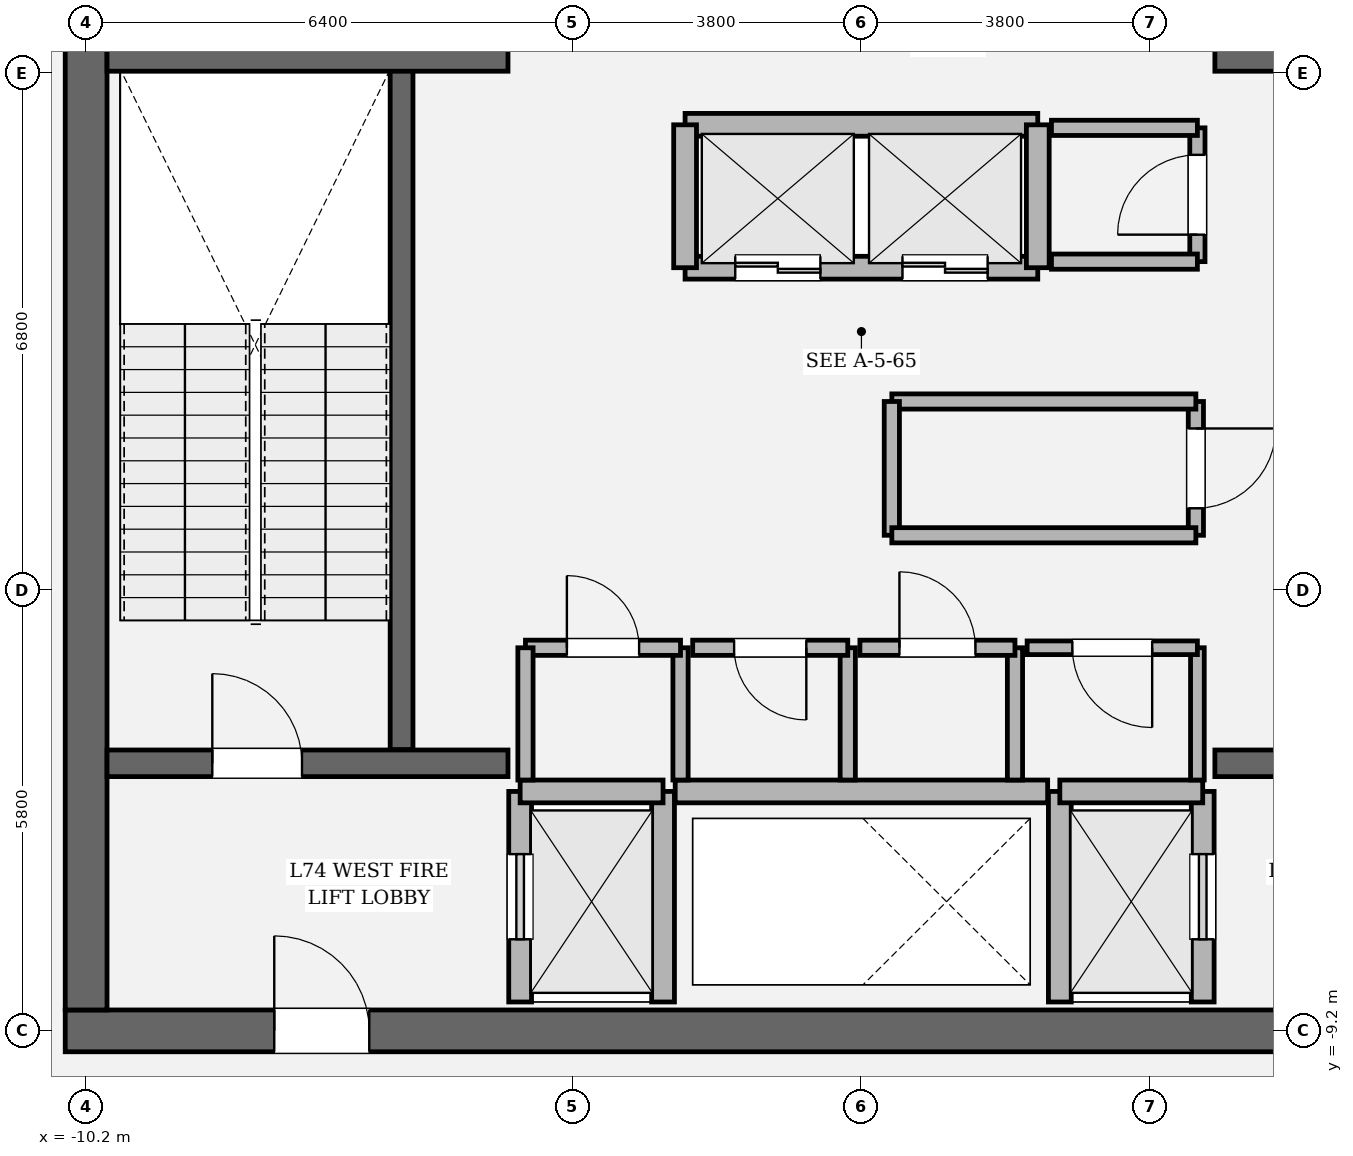
"""IFC4 building model, lengths in metres.
Left out: names, types, materials, properties, quantities, classifications, styles, units other than length and angle.
Written with IfcOpenShell. Run it as: python <this file> out.ifc"""

import sys

from ifc_helpers import new_model, si_unit, direction, frame, frame_2d, origin, place, context, subcontext, project, spatial, rectangle, extrude, element, fill, save


model = new_model("IFC4")
c1 = context("Model", 3, precision=1e-05, world=origin(), true_north=direction((0.0, 1.0)))
c2 = subcontext(c1, "Body", "Model", "MODEL_VIEW")
j1 = project(units=[si_unit("LENGTHUNIT", "METRE"), si_unit("PLANEANGLEUNIT", "RADIAN")], contexts=[c1])
p1 = place(None, origin())
s1 = spatial("IfcSite", under=j1, at=p1, CompositionType="ELEMENT")
p2 = place(p1, origin())
s2 = spatial("IfcBuilding", under=s1, at=p2, CompositionType="ELEMENT")
p3 = place(p2, frame((0.0, 0.0, 313.2)))
s3 = spatial("IfcBuildingStorey", under=s2, at=p3, CompositionType="ELEMENT", Elevation=313.2)
p4 = place(p3, frame((10.475, -9.2, 0.0), z_axis=(0.0, 0.0, 1.0), x_axis=(-1.0, 0.0, 0.0)))
e1 = element("IfcWall", 1, at=p4, inside=s3, PredefinedType="SHEAR", context=c2, shape_type="SweptSolid", body=[
    extrude(rectangle(XDim=20.95, YDim=0.55, at=frame_2d((10.475, 0.0))), origin(), (0.0, 0.0, 1.0), 4.2),
])
p5 = place(p4, frame((2.75, 0.0, 0.0)))
e2 = element("IfcOpeningElement", 2, at=p5, cuts=e1, PredefinedType="OPENING", context=c2, shape_type="SweptSolid", body=[
    extrude(rectangle(XDim=1.25, YDim=2.25, at=frame_2d((0.625, 1.125))), frame((0.0, 0.285, 0.0), z_axis=(0.0, -1.0, 0.0), x_axis=(1.0, 0.0, 0.0)), (0.0, 0.0, 1.0), 0.57),
])
p6 = place(p4, frame((16.95, 0.0, 0.0)))
e3 = element("IfcOpeningElement", 3, at=p6, cuts=e1, PredefinedType="OPENING", context=c2, shape_type="SweptSolid", body=[
    extrude(rectangle(XDim=1.25, YDim=2.25, at=frame_2d((0.625, 1.125))), frame((0.0, 0.285, 0.0), z_axis=(0.0, -1.0, 0.0), x_axis=(1.0, 0.0, 0.0)), (0.0, 0.0, 1.0), 0.57),
])
p7 = place(p3, frame((-10.2, -8.925, 0.0), z_axis=(0.0, 0.0, 1.0), x_axis=(0.0, 1.0, 0.0)))
e4 = element("IfcWall", 4, at=p7, inside=s3, PredefinedType="SHEAR", context=c2, shape_type="SweptSolid", body=[
    extrude(rectangle(XDim=17.85, YDim=0.55, at=frame_2d((8.925, 0.0))), origin(), (0.0, 0.0, 1.0), 4.2),
])
p8 = place(p7, frame((12.715, 0.0, 0.0)))
e5 = element("IfcOpeningElement", 5, at=p8, cuts=e4, PredefinedType="OPENING", context=c2, shape_type="SweptSolid", body=[
    extrude(rectangle(XDim=1.18, YDim=2.2, at=frame_2d((0.59, 1.1))), frame((0.0, 0.285, 0.0), z_axis=(0.0, -1.0, 0.0), x_axis=(1.0, 0.0, 0.0)), (0.0, 0.0, 1.0), 0.57),
])
p9 = place(p3, frame((-6.05, -5.5, 0.0), z_axis=(0.0, 0.0, 1.0), x_axis=(0.0, 1.0, 0.0)))
e6 = element("IfcWall", 6, at=p9, inside=s3, PredefinedType="SOLIDWALL", context=c2, shape_type="SweptSolid", body=[
    extrude(rectangle(XDim=8.95, YDim=0.3, at=frame_2d((4.475, 0.0))), origin(), (0.0, 0.0, 1.0), 4.2),
])
p10 = place(p3, frame((-9.925, -5.68, 0.0), z_axis=(0.0, 0.0, 1.0), x_axis=(1.0, 0.0, 0.0)))
e7 = element("IfcWall", 7, at=p10, inside=s3, PredefinedType="SOLIDWALL", context=c2, shape_type="SweptSolid", body=[
    extrude(rectangle(XDim=5.275, YDim=0.35, at=frame_2d((2.638, 0.0))), origin(), (0.0, 0.0, 1.0), 4.2),
])
p11 = place(p10, frame((1.385, 0.0, 0.0)))
e8 = element("IfcOpeningElement", 8, at=p11, cuts=e7, PredefinedType="OPENING", context=c2, shape_type="SweptSolid", body=[
    extrude(rectangle(XDim=1.18, YDim=2.2, at=frame_2d((0.59, 1.1))), frame((0.0, 0.185, 0.0), z_axis=(0.0, -1.0, 0.0), x_axis=(1.0, 0.0, 0.0)), (0.0, 0.0, 1.0), 0.37),
])
p12 = place(p3, frame((4.65, -5.68, 0.0), z_axis=(0.0, 0.0, 1.0), x_axis=(1.0, 0.0, 0.0)))
e9 = element("IfcWall", 9, at=p12, inside=s3, PredefinedType="SOLIDWALL", context=c2, shape_type="SweptSolid", body=[
    extrude(rectangle(XDim=5.275, YDim=0.35, at=frame_2d((2.638, 0.0))), origin(), (0.0, 0.0, 1.0), 4.2),
])
p13 = place(p12, frame((2.71, 0.0, 0.0)))
e10 = element("IfcOpeningElement", 10, at=p13, cuts=e9, PredefinedType="OPENING", context=c2, shape_type="SweptSolid", body=[
    extrude(rectangle(XDim=1.18, YDim=2.2, at=frame_2d((0.59, 1.1))), frame((0.0, 0.185, 0.0), z_axis=(0.0, -1.0, 0.0), x_axis=(1.0, 0.0, 0.0)), (0.0, 0.0, 1.0), 0.37),
])
for number, where, z_axis, x_axis in (
    (11, (-9.925, 3.6, 0.0), (0.0, 0.0, 1.0), (1.0, 0.0, 0.0)),
    (12, (4.65, 3.6, 0.0), (0.0, 0.0, 1.0), (1.0, 0.0, 0.0)),
):
    element("IfcWall", number, at=place(p3, frame(where, z_axis=z_axis, x_axis=x_axis)), inside=s3, PredefinedType="SOLIDWALL", context=c2, shape_type="SweptSolid", body=[
        extrude(rectangle(XDim=5.275, YDim=0.35, at=frame_2d((2.638, 0.0))), origin(), (0.0, 0.0, 1.0), 4.2),
    ])
p14 = place(p3, frame((-4.49, -8.82, 0.0), z_axis=(0.0, 0.0, 1.0), x_axis=(0.0, 1.0, 0.0)))
e13 = element("IfcWall", 13, at=p14, inside=s3, PredefinedType="SOLIDWALL", context=c2, shape_type="SweptSolid", body=[
    extrude(rectangle(XDim=2.77, YDim=0.3, at=frame_2d((1.385, 0.0))), origin(), (0.0, 0.0, 1.0), 3.92),
])
p15 = place(p14, frame((0.825, 0.0, 0.0)))
e14 = element("IfcOpeningElement", 14, at=p15, cuts=e13, PredefinedType="OPENING", context=c2, shape_type="SweptSolid", body=[
    extrude(rectangle(XDim=1.12, YDim=2.25, at=frame_2d((0.56, 1.125))), frame((0.0, 0.16, 0.0), z_axis=(0.0, -1.0, 0.0), x_axis=(1.0, 0.0, 0.0)), (0.0, 0.0, 1.0), 0.32),
])
p16 = place(p3, frame((-2.61, -8.82, 0.0), z_axis=(0.0, 0.0, 1.0), x_axis=(0.0, 1.0, 0.0)))
e15 = element("IfcWall", 15, at=p16, inside=s3, PredefinedType="SOLIDWALL", context=c2, shape_type="SweptSolid", body=[
    extrude(rectangle(XDim=2.77, YDim=0.3, at=frame_2d((1.385, 0.0))), origin(), (0.0, 0.0, 1.0), 3.92),
])
p17 = place(p3, frame((-4.49, -6.05, 0.0), z_axis=(0.0, 0.0, 1.0), x_axis=(1.0, 0.0, 0.0)))
e16 = element("IfcWall", 16, at=p17, inside=s3, PredefinedType="SOLIDWALL", context=c2, shape_type="SweptSolid", body=[
    extrude(rectangle(XDim=1.88, YDim=0.3, at=frame_2d((0.94, 0.0))), origin(), (0.0, 0.0, 1.0), 3.92),
])
p18 = place(p3, frame((4.49, -8.82, 0.0), z_axis=(0.0, 0.0, 1.0), x_axis=(0.0, 1.0, 0.0)))
e17 = element("IfcWall", 17, at=p18, inside=s3, PredefinedType="SOLIDWALL", context=c2, shape_type="SweptSolid", body=[
    extrude(rectangle(XDim=2.77, YDim=0.3, at=frame_2d((1.385, 0.0))), origin(), (0.0, 0.0, 1.0), 3.92),
])
p19 = place(p18, frame((0.825, 0.0, 0.0)))
e18 = element("IfcOpeningElement", 18, at=p19, cuts=e17, PredefinedType="OPENING", context=c2, shape_type="SweptSolid", body=[
    extrude(rectangle(XDim=1.12, YDim=2.25, at=frame_2d((0.56, 1.125))), frame((0.0, 0.16, 0.0), z_axis=(0.0, -1.0, 0.0), x_axis=(1.0, 0.0, 0.0)), (0.0, 0.0, 1.0), 0.32),
])
p20 = place(p3, frame((2.61, -8.82, 0.0), z_axis=(0.0, 0.0, 1.0), x_axis=(0.0, 1.0, 0.0)))
e19 = element("IfcWall", 19, at=p20, inside=s3, PredefinedType="SOLIDWALL", context=c2, shape_type="SweptSolid", body=[
    extrude(rectangle(XDim=2.77, YDim=0.3, at=frame_2d((1.385, 0.0))), origin(), (0.0, 0.0, 1.0), 3.92),
])
p21 = place(p3, frame((2.61, -6.05, 0.0), z_axis=(0.0, 0.0, 1.0), x_axis=(1.0, 0.0, 0.0)))
e20 = element("IfcWall", 20, at=p21, inside=s3, PredefinedType="SOLIDWALL", context=c2, shape_type="SweptSolid", body=[
    extrude(rectangle(XDim=1.88, YDim=0.3, at=frame_2d((0.94, 0.0))), origin(), (0.0, 0.0, 1.0), 3.92),
])
p22 = place(p3, frame((-2.32, 0.84, 0.0), z_axis=(0.0, 0.0, 1.0), x_axis=(1.0, 0.0, 0.0)))
e21 = element("IfcWall", 21, at=p22, inside=s3, PredefinedType="SOLIDWALL", context=c2, shape_type="SweptSolid", body=[
    extrude(rectangle(XDim=4.64, YDim=0.3, at=frame_2d((2.32, 0.0))), origin(), (0.0, 0.0, 1.0), 3.92),
])
p23 = place(p22, frame((0.66, 0.0, 0.0)))
e22 = element("IfcOpeningElement", 22, at=p23, cuts=e21, PredefinedType="OPENING", context=c2, shape_type="SweptSolid", body=[
    extrude(rectangle(XDim=1.12, YDim=2.25, at=frame_2d((0.56, 1.125))), frame((0.0, 0.16, 0.0), z_axis=(0.0, -1.0, 0.0), x_axis=(1.0, 0.0, 0.0)), (0.0, 0.0, 1.0), 0.32),
])
p24 = place(p22, frame((2.86, 0.0, 0.0)))
e23 = element("IfcOpeningElement", 23, at=p24, cuts=e21, PredefinedType="OPENING", context=c2, shape_type="SweptSolid", body=[
    extrude(rectangle(XDim=1.12, YDim=2.25, at=frame_2d((0.56, 1.125))), frame((0.0, 0.16, 0.0), z_axis=(0.0, -1.0, 0.0), x_axis=(1.0, 0.0, 0.0)), (0.0, 0.0, 1.0), 0.32),
])
p25 = place(p3, frame((-2.32, 2.72, 0.0), z_axis=(0.0, 0.0, 1.0), x_axis=(1.0, 0.0, 0.0)))
e24 = element("IfcWall", 24, at=p25, inside=s3, PredefinedType="SOLIDWALL", context=c2, shape_type="SweptSolid", body=[
    extrude(rectangle(XDim=4.64, YDim=0.3, at=frame_2d((2.32, 0.0))), origin(), (0.0, 0.0, 1.0), 3.92),
])
for number, where, z_axis, x_axis in (
    (25, (-2.32, 0.84, 0.0), (0.0, 0.0, 1.0), (0.0, 1.0, 0.0)),
    (26, (2.32, 0.84, 0.0), (0.0, 0.0, 1.0), (0.0, 1.0, 0.0)),
):
    element("IfcWall", number, at=place(p3, frame(where, z_axis=z_axis, x_axis=x_axis)), inside=s3, PredefinedType="SOLIDWALL", context=c2, shape_type="SweptSolid", body=[
        extrude(rectangle(XDim=1.88, YDim=0.3, at=frame_2d((0.94, 0.0))), origin(), (0.0, 0.0, 1.0), 3.92),
    ])
p26 = place(p3, frame((-2.45, -6.05, 0.0), z_axis=(0.0, 0.0, 1.0), x_axis=(1.0, 0.0, 0.0)))
e27 = element("IfcWall", 27, at=p26, inside=s3, PredefinedType="SOLIDWALL", context=c2, shape_type="SweptSolid", body=[
    extrude(rectangle(XDim=4.9, YDim=0.3, at=frame_2d((2.45, 0.0))), origin(), (0.0, 0.0, 1.0), 3.92),
])
p27 = place(p3, frame((-2.38, -5.9, 0.0), z_axis=(0.0, 0.0, 1.0), x_axis=(0.0, 1.0, 0.0)))
e28 = element("IfcWall", 28, at=p27, inside=s3, PredefinedType="SOLIDWALL", context=c2, shape_type="SweptSolid", body=[
    extrude(rectangle(XDim=1.74, YDim=0.2, at=frame_2d((0.87, 0.0))), origin(), (0.0, 0.0, 1.0), 3.92),
])
p28 = place(p3, frame((-2.38, -4.16, 0.0), z_axis=(0.0, 0.0, 1.0), x_axis=(-1.0, 0.0, 0.0)))
e29 = element("IfcWall", 29, at=p28, inside=s3, PredefinedType="SOLIDWALL", context=c2, shape_type="SweptSolid", body=[
    extrude(rectangle(XDim=2.04, YDim=0.2, at=frame_2d((1.02, 0.0))), origin(), (0.0, 0.0, 1.0), 3.92),
])
p29 = place(p28, frame((0.545, 0.0, 0.0)))
e30 = element("IfcOpeningElement", 30, at=p29, cuts=e29, PredefinedType="OPENING", context=c2, shape_type="SweptSolid", body=[
    extrude(rectangle(XDim=0.95, YDim=2.15, at=frame_2d((0.475, 1.075))), frame((0.0, 0.11, 0.0), z_axis=(0.0, -1.0, 0.0), x_axis=(1.0, 0.0, 0.0)), (0.0, 0.0, 1.0), 0.22),
])
for number, where, z_axis, x_axis in (
    (31, (-4.42, -4.16, 0.0), (0.0, 0.0, 1.0), (0.0, -1.0, 0.0)),
    (32, (-0.18, -5.9, 0.0), (0.0, 0.0, 1.0), (0.0, 1.0, 0.0)),
):
    element("IfcWall", number, at=place(p3, frame(where, z_axis=z_axis, x_axis=x_axis)), inside=s3, PredefinedType="SOLIDWALL", context=c2, shape_type="SweptSolid", body=[
        extrude(rectangle(XDim=1.74, YDim=0.2, at=frame_2d((0.87, 0.0))), origin(), (0.0, 0.0, 1.0), 3.92),
    ])
p30 = place(p3, frame((-0.18, -4.16, 0.0), z_axis=(0.0, 0.0, 1.0), x_axis=(-1.0, 0.0, 0.0)))
e33 = element("IfcWall", 33, at=p30, inside=s3, PredefinedType="SOLIDWALL", context=c2, shape_type="SweptSolid", body=[
    extrude(rectangle(XDim=2.04, YDim=0.2, at=frame_2d((1.02, 0.0))), origin(), (0.0, 0.0, 1.0), 3.92),
])
p31 = place(p30, frame((0.545, 0.0, 0.0)))
e34 = element("IfcOpeningElement", 34, at=p31, cuts=e33, PredefinedType="OPENING", context=c2, shape_type="SweptSolid", body=[
    extrude(rectangle(XDim=0.95, YDim=2.15, at=frame_2d((0.475, 1.075))), frame((0.0, 0.11, 0.0), z_axis=(0.0, -1.0, 0.0), x_axis=(1.0, 0.0, 0.0)), (0.0, 0.0, 1.0), 0.22),
])
p32 = place(p3, frame((2.02, -5.9, 0.0), z_axis=(0.0, 0.0, 1.0), x_axis=(0.0, 1.0, 0.0)))
e35 = element("IfcWall", 35, at=p32, inside=s3, PredefinedType="SOLIDWALL", context=c2, shape_type="SweptSolid", body=[
    extrude(rectangle(XDim=1.74, YDim=0.2, at=frame_2d((0.87, 0.0))), origin(), (0.0, 0.0, 1.0), 3.92),
])
p33 = place(p3, frame((2.02, -4.16, 0.0), z_axis=(0.0, 0.0, 1.0), x_axis=(-1.0, 0.0, 0.0)))
e36 = element("IfcWall", 36, at=p33, inside=s3, PredefinedType="SOLIDWALL", context=c2, shape_type="SweptSolid", body=[
    extrude(rectangle(XDim=2.04, YDim=0.2, at=frame_2d((1.02, 0.0))), origin(), (0.0, 0.0, 1.0), 3.92),
])
p34 = place(p33, frame((0.52, 0.0, 0.0)))
e37 = element("IfcOpeningElement", 37, at=p34, cuts=e36, PredefinedType="OPENING", context=c2, shape_type="SweptSolid", body=[
    extrude(rectangle(XDim=1.0, YDim=2.15, at=frame_2d((0.5, 1.075))), frame((0.0, 0.11, 0.0), z_axis=(0.0, -1.0, 0.0), x_axis=(1.0, 0.0, 0.0)), (0.0, 0.0, 1.0), 0.22),
])
p35 = place(p3, frame((4.42, -5.9, 0.0), z_axis=(0.0, 0.0, 1.0), x_axis=(0.0, 1.0, 0.0)))
e38 = element("IfcWall", 38, at=p35, inside=s3, PredefinedType="PARTITIONING", context=c2, shape_type="SweptSolid", body=[
    extrude(rectangle(XDim=1.74, YDim=0.18, at=frame_2d((0.87, 0.0))), origin(), (0.0, 0.0, 1.0), 3.92),
])
p36 = place(p3, frame((4.42, -4.16, 0.0), z_axis=(0.0, 0.0, 1.0), x_axis=(-1.0, 0.0, 0.0)))
e39 = element("IfcWall", 39, at=p36, inside=s3, PredefinedType="PARTITIONING", context=c2, shape_type="SweptSolid", body=[
    extrude(rectangle(XDim=2.24, YDim=0.18, at=frame_2d((1.12, 0.0))), origin(), (0.0, 0.0, 1.0), 3.92),
])
p37 = place(p36, frame((0.595, 0.0, 0.0)))
e40 = element("IfcOpeningElement", 40, at=p37, cuts=e39, PredefinedType="OPENING", context=c2, shape_type="SweptSolid", body=[
    extrude(rectangle(XDim=1.05, YDim=2.2, at=frame_2d((0.525, 1.1))), frame((0.0, 0.1, 0.0), z_axis=(0.0, -1.0, 0.0), x_axis=(1.0, 0.0, 0.0)), (0.0, 0.0, 1.0), 0.2),
])
p38 = place(p3, frame((4.4, -2.68, 0.0), z_axis=(0.0, 0.0, 1.0), x_axis=(0.0, 1.0, 0.0)))
e41 = element("IfcWall", 41, at=p38, inside=s3, PredefinedType="SOLIDWALL", context=c2, shape_type="SweptSolid", body=[
    extrude(rectangle(XDim=1.76, YDim=0.2, at=frame_2d((0.88, 0.0))), origin(), (0.0, 0.0, 1.0), 3.92),
])
p39 = place(p38, frame((0.355, 0.0, 0.0)))
e42 = element("IfcOpeningElement", 42, at=p39, cuts=e41, PredefinedType="OPENING", context=c2, shape_type="SweptSolid", body=[
    extrude(rectangle(XDim=1.05, YDim=2.2, at=frame_2d((0.525, 1.1))), frame((0.0, 0.11, 0.0), z_axis=(0.0, -1.0, 0.0), x_axis=(1.0, 0.0, 0.0)), (0.0, 0.0, 1.0), 0.22),
])
p40 = place(p3, frame((4.4, -0.92, 0.0), z_axis=(0.0, 0.0, 1.0), x_axis=(-1.0, 0.0, 0.0)))
e43 = element("IfcWall", 43, at=p40, inside=s3, PredefinedType="SOLIDWALL", context=c2, shape_type="SweptSolid", body=[
    extrude(rectangle(XDim=4.0, YDim=0.2, at=frame_2d((2.0, 0.0))), origin(), (0.0, 0.0, 1.0), 3.92),
])
p41 = place(p3, frame((0.4, -0.92, 0.0), z_axis=(0.0, 0.0, 1.0), x_axis=(0.0, -1.0, 0.0)))
e44 = element("IfcWall", 44, at=p41, inside=s3, PredefinedType="SOLIDWALL", context=c2, shape_type="SweptSolid", body=[
    extrude(rectangle(XDim=1.76, YDim=0.2, at=frame_2d((0.88, 0.0))), origin(), (0.0, 0.0, 1.0), 3.92),
])
p42 = place(p3, frame((0.4, -2.68, 0.0), z_axis=(0.0, 0.0, 1.0), x_axis=(1.0, 0.0, 0.0)))
e45 = element("IfcWall", 45, at=p42, inside=s3, PredefinedType="SOLIDWALL", context=c2, shape_type="SweptSolid", body=[
    extrude(rectangle(XDim=4.0, YDim=0.2, at=frame_2d((2.0, 0.0))), origin(), (0.0, 0.0, 1.0), 3.92),
])
p43 = place(p3, frame((4.42, 0.92, 0.0), z_axis=(0.0, 0.0, 1.0), x_axis=(0.0, 1.0, 0.0)))
e46 = element("IfcWall", 46, at=p43, inside=s3, PredefinedType="SOLIDWALL", context=c2, shape_type="SweptSolid", body=[
    extrude(rectangle(XDim=1.76, YDim=0.2, at=frame_2d((0.88, 0.0))), origin(), (0.0, 0.0, 1.0), 3.92),
])
p44 = place(p43, frame((0.355, 0.0, 0.0)))
e47 = element("IfcOpeningElement", 47, at=p44, cuts=e46, PredefinedType="OPENING", context=c2, shape_type="SweptSolid", body=[
    extrude(rectangle(XDim=1.05, YDim=2.2, at=frame_2d((0.525, 1.1))), frame((0.0, 0.11, 0.0), z_axis=(0.0, -1.0, 0.0), x_axis=(1.0, 0.0, 0.0)), (0.0, 0.0, 1.0), 0.22),
])
for number, where, z_axis, x_axis in (
    (48, (4.42, 2.68, 0.0), (0.0, 0.0, 1.0), (-1.0, 0.0, 0.0)),
    (49, (2.5, 0.92, 0.0), (0.0, 0.0, 1.0), (1.0, 0.0, 0.0)),
):
    element("IfcWall", number, at=place(p3, frame(where, z_axis=z_axis, x_axis=x_axis)), inside=s3, PredefinedType="SOLIDWALL", context=c2, shape_type="SweptSolid", body=[
        extrude(rectangle(XDim=1.92, YDim=0.2, at=frame_2d((0.96, 0.0))), origin(), (0.0, 0.0, 1.0), 3.92),
    ])
p45 = place(p11, origin())
e50 = element("IfcDoor", 50, at=p45, inside=s3, OperationType="SINGLE_SWING_LEFT", PredefinedType="DOOR", context=c2, shape_type="SweptSolid", body=[
    extrude(rectangle(XDim=1.18, YDim=2.2, at=frame_2d((0.59, 1.1))), frame((0.0, 0.025, 0.0), z_axis=(0.0, -1.0, 0.0), x_axis=(1.0, 0.0, 0.0)), (0.0, 0.0, 1.0), 0.05),
])
fill(e8, e50)
p46 = place(p6, origin())
e51 = element("IfcDoor", 51, at=p46, inside=s3, OperationType="SINGLE_SWING_RIGHT", PredefinedType="DOOR", context=c2, shape_type="SweptSolid", body=[
    extrude(rectangle(XDim=1.25, YDim=2.25, at=frame_2d((0.625, 1.125))), frame((0.0, 0.025, 0.0), z_axis=(0.0, -1.0, 0.0), x_axis=(1.0, 0.0, 0.0)), (0.0, 0.0, 1.0), 0.05),
])
fill(e3, e51)
p47 = place(p15, origin())
e52 = element("IfcDoor", 52, at=p47, inside=s3, OperationType="SLIDING_TO_LEFT", PredefinedType="DOOR", context=c2, shape_type="SweptSolid", body=[
    extrude(rectangle(XDim=1.12, YDim=2.25, at=frame_2d((0.56, 1.125))), frame((0.0, 0.025, 0.0), z_axis=(0.0, -1.0, 0.0), x_axis=(1.0, 0.0, 0.0)), (0.0, 0.0, 1.0), 0.05),
])
fill(e14, e52)
p48 = place(p19, origin())
e53 = element("IfcDoor", 53, at=p48, inside=s3, OperationType="SLIDING_TO_RIGHT", PredefinedType="DOOR", context=c2, shape_type="SweptSolid", body=[
    extrude(rectangle(XDim=1.12, YDim=2.25, at=frame_2d((0.56, 1.125))), frame((0.0, 0.025, 0.0), z_axis=(0.0, -1.0, 0.0), x_axis=(1.0, 0.0, 0.0)), (0.0, 0.0, 1.0), 0.05),
])
fill(e18, e53)
p49 = place(p23, origin())
e54 = element("IfcDoor", 54, at=p49, inside=s3, OperationType="DOUBLE_DOOR_SLIDING", PredefinedType="DOOR", context=c2, shape_type="SweptSolid", body=[
    extrude(rectangle(XDim=1.12, YDim=2.25, at=frame_2d((0.56, 1.125))), frame((0.0, 0.025, 0.0), z_axis=(0.0, -1.0, 0.0), x_axis=(1.0, 0.0, 0.0)), (0.0, 0.0, 1.0), 0.05),
])
fill(e22, e54)
p50 = place(p24, origin())
e55 = element("IfcDoor", 55, at=p50, inside=s3, OperationType="DOUBLE_DOOR_SLIDING", PredefinedType="DOOR", context=c2, shape_type="SweptSolid", body=[
    extrude(rectangle(XDim=1.12, YDim=2.25, at=frame_2d((0.56, 1.125))), frame((0.0, 0.025, 0.0), z_axis=(0.0, -1.0, 0.0), x_axis=(1.0, 0.0, 0.0)), (0.0, 0.0, 1.0), 0.05),
])
fill(e23, e55)
p51 = place(p29, origin())
e56 = element("IfcDoor", 56, at=p51, inside=s3, OperationType="SINGLE_SWING_RIGHT", PredefinedType="DOOR", context=c2, shape_type="SweptSolid", body=[
    extrude(rectangle(XDim=0.95, YDim=2.15, at=frame_2d((0.475, 1.075))), frame((0.0, 0.025, 0.0), z_axis=(0.0, -1.0, 0.0), x_axis=(1.0, 0.0, 0.0)), (0.0, 0.0, 1.0), 0.05),
])
fill(e30, e56)
p52 = place(p31, origin())
e57 = element("IfcDoor", 57, at=p52, inside=s3, OperationType="SINGLE_SWING_LEFT", PredefinedType="DOOR", context=c2, shape_type="SweptSolid", body=[
    extrude(rectangle(XDim=0.95, YDim=2.15, at=frame_2d((0.475, 1.075))), frame((0.0, 0.025, 0.0), z_axis=(0.0, -1.0, 0.0), x_axis=(1.0, 0.0, 0.0)), (0.0, 0.0, 1.0), 0.05),
])
fill(e34, e57)
p53 = place(p34, origin())
e58 = element("IfcDoor", 58, at=p53, inside=s3, OperationType="SINGLE_SWING_RIGHT", PredefinedType="DOOR", context=c2, shape_type="SweptSolid", body=[
    extrude(rectangle(XDim=1.0, YDim=2.15, at=frame_2d((0.5, 1.075))), frame((0.0, 0.025, 0.0), z_axis=(0.0, -1.0, 0.0), x_axis=(1.0, 0.0, 0.0)), (0.0, 0.0, 1.0), 0.05),
])
fill(e37, e58)
p54 = place(p37, origin())
e59 = element("IfcDoor", 59, at=p54, inside=s3, OperationType="SINGLE_SWING_LEFT", PredefinedType="DOOR", context=c2, shape_type="SweptSolid", body=[
    extrude(rectangle(XDim=1.05, YDim=2.2, at=frame_2d((0.525, 1.1))), frame((0.0, 0.025, 0.0), z_axis=(0.0, -1.0, 0.0), x_axis=(1.0, 0.0, 0.0)), (0.0, 0.0, 1.0), 0.05),
])
fill(e40, e59)
p55 = place(p39, origin())
e60 = element("IfcDoor", 60, at=p55, inside=s3, OperationType="SINGLE_SWING_RIGHT", PredefinedType="DOOR", context=c2, shape_type="SweptSolid", body=[
    extrude(rectangle(XDim=1.05, YDim=2.2, at=frame_2d((0.525, 1.1))), frame((0.0, 0.025, 0.0), z_axis=(0.0, -1.0, 0.0), x_axis=(1.0, 0.0, 0.0)), (0.0, 0.0, 1.0), 0.05),
])
fill(e42, e60)
p56 = place(p44, origin())
e61 = element("IfcDoor", 61, at=p56, inside=s3, OperationType="SINGLE_SWING_LEFT", PredefinedType="DOOR", context=c2, shape_type="SweptSolid", body=[
    extrude(rectangle(XDim=1.05, YDim=2.2, at=frame_2d((0.525, 1.1))), frame((0.0, 0.025, 0.0), z_axis=(0.0, -1.0, 0.0), x_axis=(1.0, 0.0, 0.0)), (0.0, 0.0, 1.0), 0.05),
])
fill(e47, e61)
save(model, sys.argv[1])
